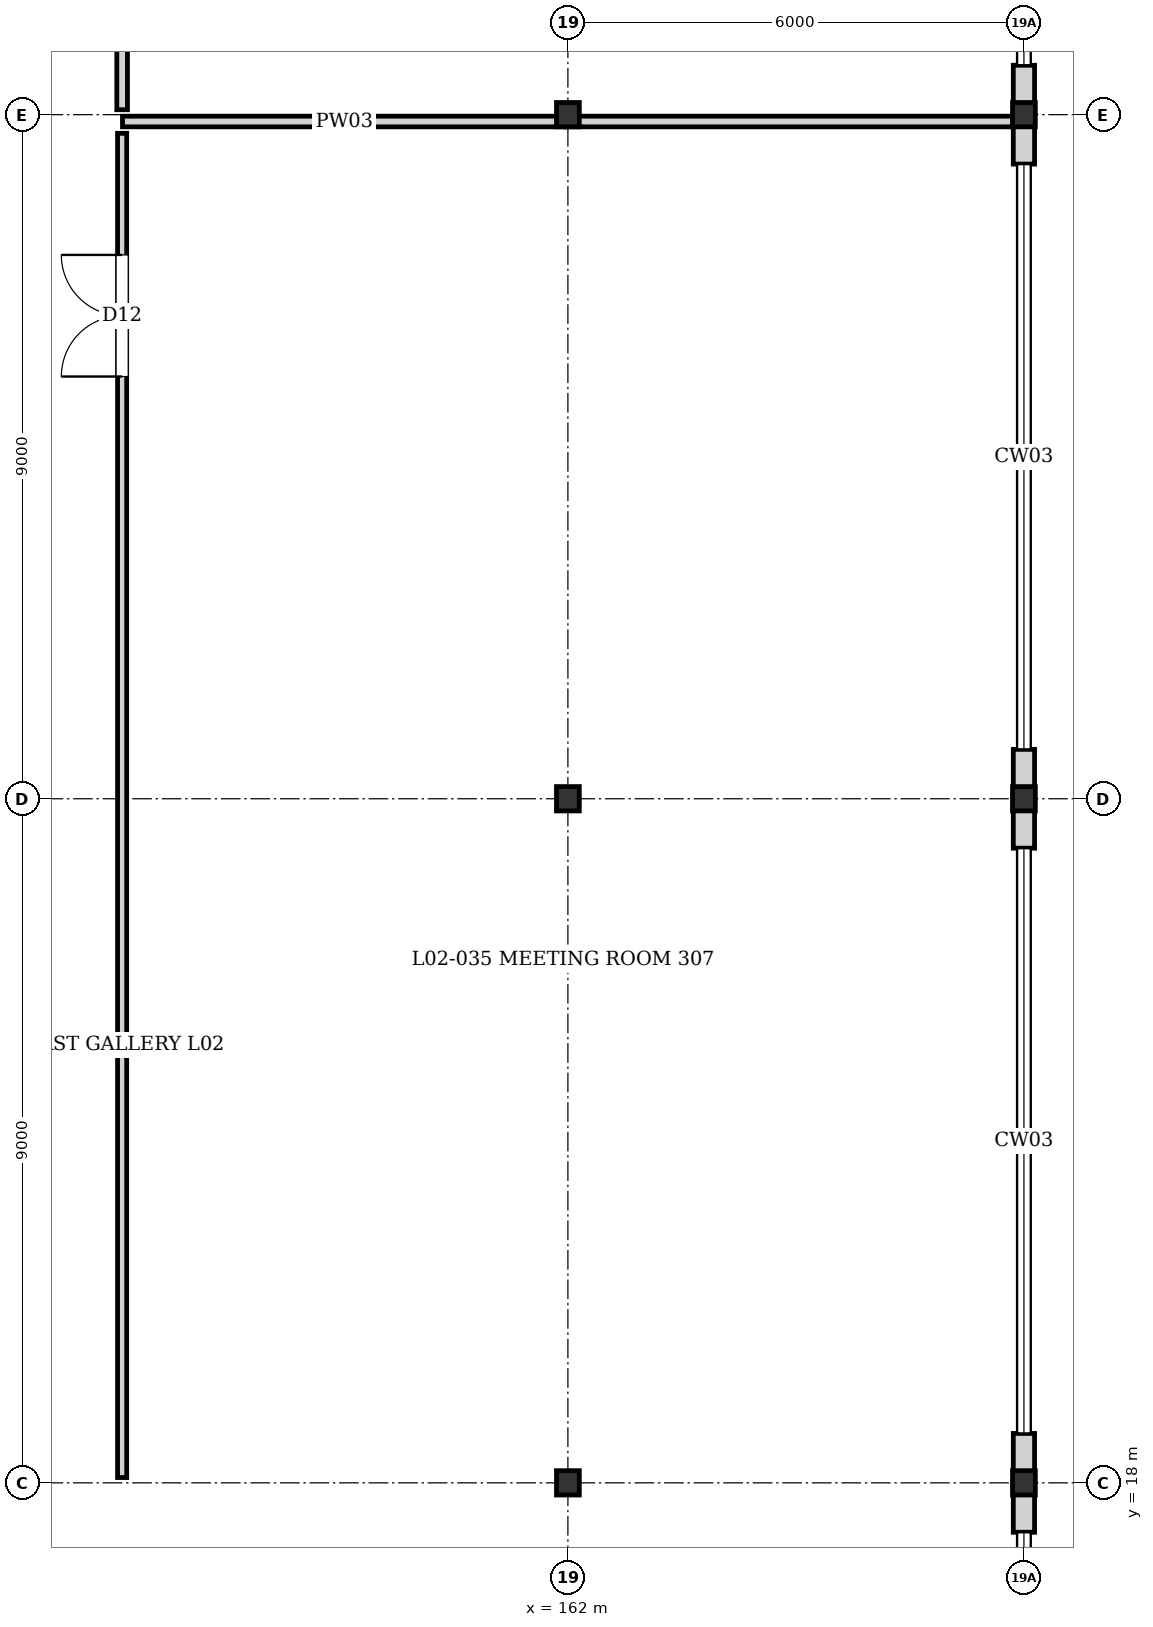
"""IFC4 building model, lengths in metres.
Left out: names, types, materials, properties, quantities, classifications, styles, units other than length and angle.
Written with IfcOpenShell. Run it as: python <this file> out.ifc"""

import sys

from ifc_helpers import new_model, si_unit, direction, frame, frame_2d, origin, origin_2d, place, context, subcontext, project, spatial, rectangle, i_section, extrude, element, fill, save


model = new_model("IFC4")
c1 = context("Model", 3, precision=1e-05, world=origin(), true_north=direction((0.0, 1.0)))
c2 = subcontext(c1, "Body", "Model", "MODEL_VIEW")
j1 = project(units=[si_unit("LENGTHUNIT", "METRE"), si_unit("PLANEANGLEUNIT", "RADIAN")], contexts=[c1])
p1 = place(None, origin())
s1 = spatial("IfcSite", under=j1, at=p1, CompositionType="ELEMENT")
p2 = place(p1, origin())
s2 = spatial("IfcBuilding", under=s1, at=p2, CompositionType="ELEMENT")
p3 = place(p2, frame((0.0, 0.0, 8.16)))
s3 = spatial("IfcBuildingStorey", under=s2, at=p3, CompositionType="ELEMENT", Elevation=8.16)
for number, where, z_axis, x_axis in (
    (1, (162.0, 18.0, 0.0), (0.0, 0.0, 1.0), (1.0, 0.0, 0.0)),
    (2, (162.0, 27.0, 0.0), (0.0, 0.0, 1.0), (1.0, 0.0, 0.0)),
    (3, (162.0, 36.0, 0.0), (0.0, 0.0, 1.0), (1.0, 0.0, 0.0)),
    (4, (168.0, 18.0, 0.0), (0.0, 0.0, 1.0), (1.0, 0.0, 0.0)),
    (5, (168.0, 27.0, 0.0), (0.0, 0.0, 1.0), (1.0, 0.0, 0.0)),
    (6, (168.0, 36.0, 0.0), (0.0, 0.0, 1.0), (1.0, 0.0, 0.0)),
):
    element("IfcColumn", number, at=place(p3, frame(where, z_axis=z_axis, x_axis=x_axis)), inside=s3, PredefinedType="COLUMN", context=c2, shape_type="SweptSolid", body=[
        extrude(i_section(OverallWidth=0.3, OverallDepth=0.32, WebThickness=0.011, FlangeThickness=0.021, at=origin_2d()), origin(), (0.0, 0.0, 1.0), 3.36),
    ])
p4 = place(p3, frame((168.0, 36.65, 0.0), z_axis=(0.0, 0.0, 1.0), x_axis=(0.0, -1.0, 0.0)))
e7 = element("IfcWall", 7, at=p4, inside=s3, PredefinedType="SOLIDWALL", context=c2, shape_type="SweptSolid", body=[
    extrude(rectangle(XDim=0.65, YDim=0.28, at=frame_2d((0.325, 0.0))), origin(), (0.0, 0.0, 1.0), 2.8),
])
for number, where, z_axis, x_axis in (
    (8, (168.0, 36.0, 0.0), (0.0, 0.0, 1.0), (0.0, -1.0, 0.0)),
    (9, (168.0, 27.65, 0.0), (0.0, 0.0, 1.0), (0.0, -1.0, 0.0)),
):
    element("IfcWall", number, at=place(p3, frame(where, z_axis=z_axis, x_axis=x_axis)), inside=s3, PredefinedType="SOLIDWALL", context=c2, shape_type="SweptSolid", body=[
        extrude(rectangle(XDim=0.65, YDim=0.28, at=frame_2d((0.325, 0.0))), origin(), (0.0, 0.0, 1.0), 3.11),
    ])
for number, where, z_axis, x_axis in (
    (10, (168.0, 27.0, 0.0), (0.0, 0.0, 1.0), (0.0, -1.0, 0.0)),
    (11, (168.0, 18.65, 0.0), (0.0, 0.0, 1.0), (0.0, -1.0, 0.0)),
):
    element("IfcWall", number, at=place(p3, frame(where, z_axis=z_axis, x_axis=x_axis)), inside=s3, PredefinedType="SOLIDWALL", context=c2, shape_type="SweptSolid", body=[
        extrude(rectangle(XDim=0.65, YDim=0.28, at=frame_2d((0.325, 0.0))), origin(), (0.0, 0.0, 1.0), 2.7),
    ])
p5 = place(p3, frame((168.0, 18.0, 0.0), z_axis=(0.0, 0.0, 1.0), x_axis=(0.0, -1.0, 0.0)))
e12 = element("IfcWall", 12, at=p5, inside=s3, PredefinedType="SOLIDWALL", context=c2, shape_type="SweptSolid", body=[
    extrude(rectangle(XDim=0.65, YDim=0.28, at=frame_2d((0.325, 0.0))), origin(), (0.0, 0.0, 1.0), 2.74),
])
p6 = place(p3, frame((156.14, 35.91, 0.0), z_axis=(0.0, 0.0, 1.0), x_axis=(1.0, 0.0, 0.0)))
e13 = element("IfcWall", 13, at=p6, inside=s3, PredefinedType="PLUMBINGWALL", context=c2, shape_type="SweptSolid", body=[
    extrude(rectangle(XDim=5.84, YDim=0.14, at=frame_2d((2.92, 0.0))), origin(), (0.0, 0.0, 1.0), 2.7),
])
p7 = place(p3, frame((156.135, 18.07, 0.0), z_axis=(0.0, 0.0, 1.0), x_axis=(0.0, 1.0, 0.0)))
e14 = element("IfcWall", 14, at=p7, inside=s3, PredefinedType="PARTITIONING", context=c2, shape_type="SweptSolid", body=[
    extrude(rectangle(XDim=17.685, YDim=0.12, at=frame_2d((8.842, 0.0))), origin(), (0.0, 0.0, 1.0), 3.11),
])
p8 = place(p7, frame((14.485, 0.0, 0.0)))
e15 = element("IfcOpeningElement", 15, at=p8, cuts=e14, PredefinedType="OPENING", context=c2, shape_type="SweptSolid", body=[
    extrude(rectangle(XDim=1.6, YDim=2.3, at=frame_2d((0.8, 1.15))), frame((0.0, 0.07, 0.0), z_axis=(0.0, -1.0, 0.0), x_axis=(1.0, 0.0, 0.0)), (0.0, 0.0, 1.0), 0.14),
])
p9 = place(p3, frame((156.135, 36.065, 0.0), z_axis=(0.0, 0.0, 1.0), x_axis=(0.0, 1.0, 0.0)))
e16 = element("IfcWall", 16, at=p9, inside=s3, PredefinedType="PLUMBINGWALL", context=c2, shape_type="SweptSolid", body=[
    extrude(rectangle(XDim=8.84, YDim=0.14, at=frame_2d((4.42, 0.0))), origin(), (0.0, 0.0, 1.0), 3.11),
])
p10 = place(p9, frame((3.97, 0.0, 0.0)))
e17 = element("IfcOpeningElement", 17, at=p10, cuts=e16, PredefinedType="OPENING", context=c2, shape_type="SweptSolid", body=[
    extrude(rectangle(XDim=0.9, YDim=2.1, at=frame_2d((0.45, 1.05))), frame((0.0, 0.08, 0.0), z_axis=(0.0, -1.0, 0.0), x_axis=(1.0, 0.0, 0.0)), (0.0, 0.0, 1.0), 0.16),
])
p11 = place(p3, frame((161.98, 35.91, 0.0), z_axis=(0.0, 0.0, 1.0), x_axis=(1.0, 0.0, 0.0)))
e18 = element("IfcWall", 18, at=p11, inside=s3, PredefinedType="PLUMBINGWALL", context=c2, shape_type="SweptSolid", body=[
    extrude(rectangle(XDim=5.875, YDim=0.14, at=frame_2d((2.938, 0.0))), origin(), (0.0, 0.0, 1.0), 2.65),
])
p12 = place(p8, origin())
e19 = element("IfcDoor", 19, at=p12, inside=s3, OperationType="DOUBLE_DOOR_SINGLE_SWING", PredefinedType="DOOR", context=c2, shape_type="SweptSolid", body=[
    extrude(rectangle(XDim=1.6, YDim=2.3, at=frame_2d((0.8, 1.15))), frame((0.0, 0.025, 0.0), z_axis=(0.0, -1.0, 0.0), x_axis=(1.0, 0.0, 0.0)), (0.0, 0.0, 1.0), 0.05),
])
fill(e15, e19)
save(model, sys.argv[1])
